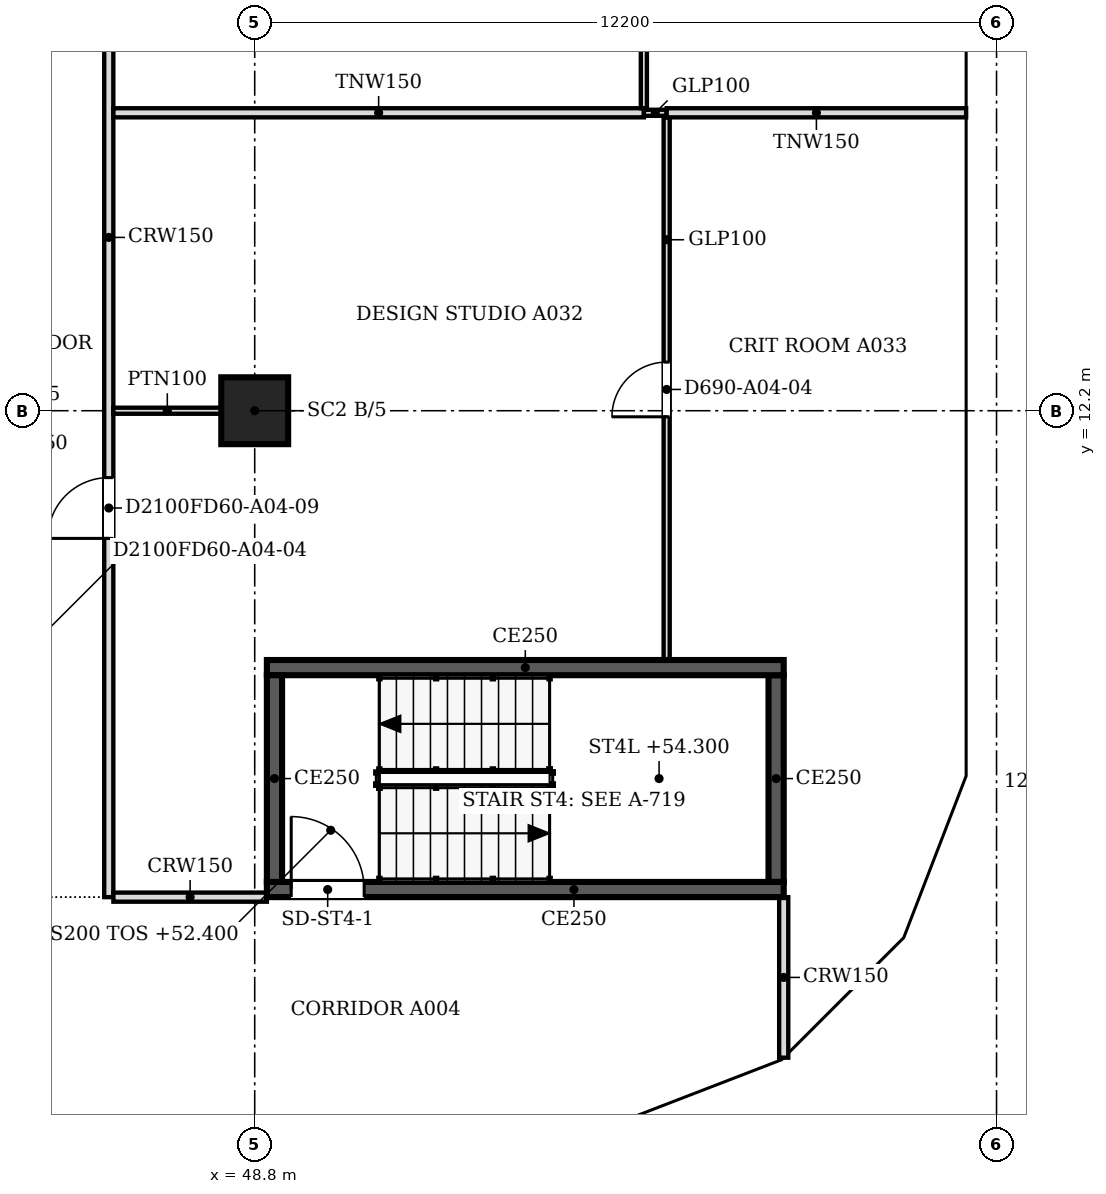
"""IFC4 building model, lengths in metres.
Left out: names, types, materials, properties, quantities, classifications, styles, units other than length and angle.
Written with IfcOpenShell. Run it as: python <this file> out.ifc"""

import sys

from ifc_helpers import new_model, si_unit, direction, frame, frame_2d, origin, origin_2d, place, context, subcontext, project, spatial, polyline, rectangle, outline, extrude, faceted_brep, source, transform, mapped, element, fill, save


model = new_model("IFC4")
c1 = context("Model", 3, precision=1e-05, world=origin(), true_north=direction((0.0, 1.0)))
c2 = subcontext(c1, "Body", "Model", "MODEL_VIEW")
j1 = project(units=[si_unit("LENGTHUNIT", "METRE"), si_unit("PLANEANGLEUNIT", "RADIAN")], contexts=[c1])
p1 = place(None, origin())
s1 = spatial("IfcSite", under=j1, at=p1, CompositionType="ELEMENT")
p2 = place(p1, origin())
s2 = spatial("IfcBuilding", under=s1, at=p2, CompositionType="ELEMENT")
p3 = place(p2, frame((0.0, 0.0, 52.4)))
s3 = spatial("IfcBuildingStorey", under=s2, at=p3, CompositionType="ELEMENT", Elevation=52.4)
p4 = place(p3, frame((48.8, 12.2, 0.0), z_axis=(0.0, 0.0, 1.0), x_axis=(1.0, 0.0, 0.0)))
e1 = element("IfcColumn", 1, at=p4, inside=s3, PredefinedType="COLUMN", context=c2, shape_type="SweptSolid", body=[
    extrude(rectangle(XDim=1.1, YDim=1.1, at=origin_2d()), origin(), (0.0, 0.0, 1.0), 3.6),
])
m1 = source(origin(), c2, "Body", "Brep", [
    faceted_brep([(2.95, -0.25, 0.0), (3.003, -0.25, 0.068), (3.003, -0.25, 7.531), (2.95, -0.25, 7.6), (0.0, -0.25, 3.8), (0.047, 0.25, 3.86), (2.898, 0.25, 7.532), (2.898, 0.25, 0.068), (0.047, 0.25, 3.74), (2.95, 0.0, 0.0), (2.95, 0.0, 7.6), (0.0, 0.0, 3.8)], [[[0, 1, 2, 3, 4]], [[5, 6, 7, 8]], [[1, 0, 9]], [[10, 3, 2]], [[6, 5, 11, 4, 3, 10]], [[8, 7, 9, 0, 4, 11]], [[8, 11, 5]], [[1, 9, 7, 6, 10, 2]]]),
])
p5 = place(p3, frame((54.854, 0.25, -3.8), z_axis=(0.0, 0.0, 1.0), x_axis=(0.932970071518, 0.359953949349, 0.0)))
e2 = element("IfcWall", 2, at=p5, inside=s3, PredefinedType="SOLIDWALL", context=c2, shape_type="MappedRepresentation", body=[
    mapped(m1, transform((0.0, 0.0, 0.0), scale=1.0)),
])
m2 = source(origin(), c2, "Body", "SweptSolid", [
    extrude(outline(polyline([(2.75, 6.935), (0.316, 3.8), (2.75, 0.665), (2.75, 6.935)])), frame((0.0, 0.26, 0.0), z_axis=(0.0, -1.0, 0.0), x_axis=(1.0, 0.0, 0.0)), (0.0, 0.0, 1.0), 0.52),
])
p6 = place(p5, origin())
e3 = element("IfcOpeningElement", 3, at=p6, cuts=e2, PredefinedType="OPENING", context=c2, shape_type="MappedRepresentation", body=[
    mapped(m2, transform((0.0, 0.0, 0.0), scale=1.0)),
])
m3 = source(origin(), c2, "Body", "Brep", [
    faceted_brep([(0.053, -0.25, 0.0), (2.997, -0.25, 3.8), (0.053, -0.25, 7.6), (0.0, -0.25, 7.532), (0.0, -0.25, 0.068), (0.106, 0.25, 7.531), (2.944, 0.25, 3.868), (2.944, 0.25, 3.732), (0.106, 0.25, 0.068), (2.997, 0.0, 3.8), (0.053, 0.0, 0.0), (0.053, 0.0, 7.6)], [[[0, 1, 2, 3, 4]], [[5, 6, 7, 8]], [[8, 7, 9, 1, 0, 10]], [[6, 5, 11, 2, 1, 9]], [[3, 2, 11]], [[10, 0, 4]], [[8, 10, 4, 3, 11, 5]], [[9, 7, 6]]]),
])
p7 = place(p3, frame((57.569, 1.274, -3.8), z_axis=(0.0, 0.0, 1.0), x_axis=(0.707066050402, 0.707147509625, 0.0)))
e4 = element("IfcWall", 4, at=p7, inside=s3, PredefinedType="SOLIDWALL", context=c2, shape_type="MappedRepresentation", body=[
    mapped(m3, transform((0.0, 0.0, 0.0), scale=1.0)),
])
m4 = source(origin(), c2, "Body", "SweptSolid", [
    extrude(outline(polyline([(0.253, 0.666), (2.681, 3.8), (0.253, 6.934), (0.253, 0.666)])), frame((0.0, 0.26, 0.0), z_axis=(0.0, -1.0, 0.0), x_axis=(1.0, 0.0, 0.0)), (0.0, 0.0, 1.0), 0.52),
])
p8 = place(p7, origin())
e5 = element("IfcOpeningElement", 5, at=p8, cuts=e4, PredefinedType="OPENING", context=c2, shape_type="MappedRepresentation", body=[
    mapped(m4, transform((0.0, 0.0, 0.0), scale=1.0)),
])
m5 = source(origin(), c2, "Body", "Brep", [
    faceted_brep([(2.95, -0.25, 0.0), (2.997, -0.25, 0.059), (2.997, -0.25, 7.541), (2.95, -0.25, 7.6), (0.0, -0.25, 3.8), (0.053, 0.25, 3.868), (2.904, 0.25, 7.54), (2.904, 0.25, 0.06), (0.053, 0.25, 3.732), (2.95, 0.0, 0.0), (2.95, 0.0, 7.6), (0.0, 0.0, 3.8)], [[[0, 1, 2, 3, 4]], [[5, 6, 7, 8]], [[1, 0, 9]], [[10, 3, 2]], [[6, 5, 11, 4, 3, 10]], [[8, 7, 9, 0, 4, 11]], [[8, 11, 5]], [[1, 9, 7, 6, 10, 2]]]),
])
p9 = place(p3, frame((59.688, 3.394, -3.8), z_axis=(0.0, 0.0, 1.0), x_axis=(0.359972353723, 0.932962970624, 0.0)))
e6 = element("IfcWall", 6, at=p9, inside=s3, PredefinedType="SOLIDWALL", context=c2, shape_type="MappedRepresentation", body=[
    mapped(m5, transform((0.0, 0.0, 0.0), scale=1.0)),
])
p10 = place(p9, origin())
e7 = element("IfcOpeningElement", 7, at=p10, cuts=e6, PredefinedType="OPENING", context=c2, shape_type="MappedRepresentation", body=[
    mapped(m2, transform((0.0, 0.0, 0.0), scale=1.0)),
])
m6 = source(origin(), c2, "Body", "Brep", [
    faceted_brep([(0.047, -0.25, 0.0), (3.05, -0.25, 3.8), (0.047, -0.25, 7.6), (0.0, -0.25, 7.54), (0.0, -0.25, 0.06), (0.093, 0.25, 7.541), (3.05, 0.25, 3.8), (0.093, 0.25, 0.059), (0.047, 0.0, 0.0), (0.047, 0.0, 7.6)], [[[0, 1, 2, 3, 4]], [[5, 6, 7]], [[7, 6, 1, 0, 8]], [[6, 5, 9, 2, 1]], [[3, 2, 9]], [[8, 0, 4]], [[7, 8, 4, 3, 9, 5]]]),
])
p11 = place(p3, frame((60.75, 6.1, -3.8), z_axis=(0.0, 0.0, 1.0), x_axis=(0.0, 1.0, 0.0)))
e8 = element("IfcWall", 8, at=p11, inside=s3, PredefinedType="SOLIDWALL", context=c2, shape_type="MappedRepresentation", body=[
    mapped(m6, transform((0.0, 0.0, 0.0), scale=1.0)),
])
m7 = source(origin(), c2, "Body", "SweptSolid", [
    extrude(outline(polyline([(0.247, 0.656), (2.731, 3.8), (0.247, 6.944), (0.247, 0.656)])), frame((0.0, 0.26, 0.0), z_axis=(0.0, -1.0, 0.0), x_axis=(1.0, 0.0, 0.0)), (0.0, 0.0, 1.0), 0.52),
])
p12 = place(p11, origin())
e9 = element("IfcOpeningElement", 9, at=p12, cuts=e8, PredefinedType="OPENING", context=c2, shape_type="MappedRepresentation", body=[
    mapped(m7, transform((0.0, 0.0, 0.0), scale=1.0)),
])
m8 = source(origin(), c2, "Body", "SweptSolid", [
    extrude(outline(polyline([(3.05, 0.0), (6.1, 3.8), (3.05, 7.6), (0.0, 3.8), (3.05, 0.0)])), frame((0.0, 0.25, 0.0), z_axis=(0.0, -1.0, 0.0), x_axis=(1.0, 0.0, 0.0)), (0.0, 0.0, 1.0), 0.5),
])
p13 = place(p3, frame((60.75, 9.15, -3.8), z_axis=(0.0, 0.0, 1.0), x_axis=(0.0, 1.0, 0.0)))
e10 = element("IfcWall", 10, at=p13, inside=s3, PredefinedType="SOLIDWALL", context=c2, shape_type="MappedRepresentation", body=[
    mapped(m8, transform((0.0, 0.0, 0.0), scale=1.0)),
])
m9 = source(origin(), c2, "Body", "SweptSolid", [
    extrude(outline(polyline([(3.05, 0.399), (5.78, 3.8), (3.05, 7.2), (0.321, 3.8), (3.05, 0.399)])), frame((0.0, 0.26, 0.0), z_axis=(0.0, -1.0, 0.0), x_axis=(1.0, 0.0, 0.0)), (0.0, 0.0, 1.0), 0.52),
])
p14 = place(p13, origin())
e11 = element("IfcOpeningElement", 11, at=p14, cuts=e10, PredefinedType="OPENING", context=c2, shape_type="MappedRepresentation", body=[
    mapped(m9, transform((0.0, 0.0, 0.0), scale=1.0)),
])
p15 = place(p3, frame((60.75, 15.25, -3.8), z_axis=(0.0, 0.0, 1.0), x_axis=(0.0, 1.0, 0.0)))
e12 = element("IfcWall", 12, at=p15, inside=s3, PredefinedType="SOLIDWALL", context=c2, shape_type="MappedRepresentation", body=[
    mapped(m8, transform((0.0, 0.0, 0.0), scale=1.0)),
])
p16 = place(p15, origin())
e13 = element("IfcOpeningElement", 13, at=p16, cuts=e12, PredefinedType="OPENING", context=c2, shape_type="MappedRepresentation", body=[
    mapped(m9, transform((0.0, 0.0, 0.0), scale=1.0)),
])
p17 = place(p2, frame((0.0, 0.0, 56.2)))
s4 = spatial("IfcBuildingStorey", under=s2, at=p17, CompositionType="ELEMENT", Elevation=56.2)
m10 = source(origin(), c2, "Body", "Brep", [
    faceted_brep([(0.047, -0.25, 0.0), (2.997, -0.25, 3.8), (0.047, -0.25, 7.6), (0.0, -0.25, 7.541), (0.0, -0.25, 0.059), (0.093, 0.25, 7.54), (2.944, 0.25, 3.868), (2.944, 0.25, 3.732), (0.093, 0.25, 0.06), (2.997, 0.0, 3.8), (0.047, 0.0, 0.0), (0.047, 0.0, 7.6)], [[[0, 1, 2, 3, 4]], [[5, 6, 7, 8]], [[8, 7, 9, 1, 0, 10]], [[6, 5, 11, 2, 1, 9]], [[3, 2, 11]], [[10, 0, 4]], [[8, 10, 4, 3, 11, 5]], [[9, 7, 6]]]),
])
p18 = place(p17, frame((54.81, 0.233, -3.8), z_axis=(0.0, 0.0, 1.0), x_axis=(0.932990326376, 0.359901446078, 0.0)))
e14 = element("IfcWall", 14, at=p18, inside=s4, PredefinedType="SOLIDWALL", context=c2, shape_type="MappedRepresentation", body=[
    mapped(m10, transform((0.0, 0.0, 0.0), scale=1.0)),
])
m11 = source(origin(), c2, "Body", "SweptSolid", [
    extrude(outline(polyline([(0.247, 0.665), (2.681, 3.8), (0.247, 6.935), (0.247, 0.665)])), frame((0.0, 0.26, 0.0), z_axis=(0.0, -1.0, 0.0), x_axis=(1.0, 0.0, 0.0)), (0.0, 0.0, 1.0), 0.52),
])
p19 = place(p18, origin())
e15 = element("IfcOpeningElement", 15, at=p19, cuts=e14, PredefinedType="OPENING", context=c2, shape_type="MappedRepresentation", body=[
    mapped(m11, transform((0.0, 0.0, 0.0), scale=1.0)),
])
m12 = source(origin(), c2, "Body", "Brep", [
    faceted_brep([(2.944, -0.25, 0.0), (2.997, -0.25, 0.068), (2.997, -0.25, 7.532), (2.944, -0.25, 7.6), (0.0, -0.25, 3.8), (0.053, 0.25, 3.868), (2.891, 0.25, 7.532), (2.891, 0.25, 0.068), (0.053, 0.25, 3.732), (2.944, 0.0, 0.0), (2.944, 0.0, 7.6), (0.0, 0.0, 3.8)], [[[0, 1, 2, 3, 4]], [[5, 6, 7, 8]], [[1, 0, 9]], [[10, 3, 2]], [[6, 5, 11, 4, 3, 10]], [[8, 7, 9, 0, 4, 11]], [[8, 11, 5]], [[1, 9, 7, 6, 10, 2]]]),
])
p20 = place(p17, frame((57.606, 1.312, -3.8), z_axis=(0.0, 0.0, 1.0), x_axis=(0.707147509625, 0.707066050402, 0.0)))
e16 = element("IfcWall", 16, at=p20, inside=s4, PredefinedType="SOLIDWALL", context=c2, shape_type="MappedRepresentation", body=[
    mapped(m12, transform((0.0, 0.0, 0.0), scale=1.0)),
])
m13 = source(origin(), c2, "Body", "SweptSolid", [
    extrude(outline(polyline([(2.744, 6.934), (0.316, 3.8), (2.744, 0.667), (2.744, 6.934)])), frame((0.0, 0.26, 0.0), z_axis=(0.0, -1.0, 0.0), x_axis=(1.0, 0.0, 0.0)), (0.0, 0.0, 1.0), 0.52),
])
p21 = place(p20, origin())
e17 = element("IfcOpeningElement", 17, at=p21, cuts=e16, PredefinedType="OPENING", context=c2, shape_type="MappedRepresentation", body=[
    mapped(m13, transform((0.0, 0.0, 0.0), scale=1.0)),
])
m14 = source(origin(), c2, "Body", "Brep", [
    faceted_brep([(0.053, -0.25, 0.0), (3.003, -0.25, 3.8), (0.053, -0.25, 7.6), (0.0, -0.25, 7.532), (0.0, -0.25, 0.068), (0.106, 0.25, 7.532), (2.957, 0.25, 3.86), (2.957, 0.25, 3.74), (0.106, 0.25, 0.068), (3.003, 0.0, 3.8), (0.053, 0.0, 0.0), (0.053, 0.0, 7.6)], [[[0, 1, 2, 3, 4]], [[5, 6, 7, 8]], [[8, 7, 9, 1, 0, 10]], [[6, 5, 11, 2, 1, 9]], [[3, 2, 11]], [[10, 0, 4]], [[8, 10, 4, 3, 11, 5]], [[9, 7, 6]]]),
])
p22 = place(p17, frame((59.669, 3.344, -3.8), z_axis=(0.0, 0.0, 1.0), x_axis=(0.35992665181, 0.932980602862, 0.0)))
e18 = element("IfcWall", 18, at=p22, inside=s4, PredefinedType="SOLIDWALL", context=c2, shape_type="MappedRepresentation", body=[
    mapped(m14, transform((0.0, 0.0, 0.0), scale=1.0)),
])
m15 = source(origin(), c2, "Body", "SweptSolid", [
    extrude(outline(polyline([(0.253, 0.665), (2.687, 3.8), (0.253, 6.935), (0.253, 0.665)])), frame((0.0, 0.26, 0.0), z_axis=(0.0, -1.0, 0.0), x_axis=(1.0, 0.0, 0.0)), (0.0, 0.0, 1.0), 0.52),
])
p23 = place(p22, origin())
e19 = element("IfcOpeningElement", 19, at=p23, cuts=e18, PredefinedType="OPENING", context=c2, shape_type="MappedRepresentation", body=[
    mapped(m15, transform((0.0, 0.0, 0.0), scale=1.0)),
])
m16 = source(origin(), c2, "Body", "Brep", [
    faceted_brep([(3.003, -0.25, 0.0), (6.053, -0.25, 3.8), (3.003, -0.25, 7.6), (0.0, -0.25, 3.8), (0.047, 0.25, 3.859), (3.003, 0.25, 7.6), (6.053, 0.25, 3.8), (3.003, 0.25, 0.0), (0.047, 0.25, 3.741), (0.0, 0.0, 3.8)], [[[0, 1, 2, 3]], [[4, 5, 6, 7, 8]], [[7, 6, 1, 0]], [[6, 5, 2, 1]], [[5, 4, 9, 3, 2]], [[8, 7, 0, 3, 9]], [[8, 9, 4]]]),
])
p24 = place(p17, frame((60.75, 6.146, -3.8), z_axis=(0.0, 0.0, 1.0), x_axis=(0.0, 1.0, 0.0)))
e20 = element("IfcWall", 20, at=p24, inside=s4, PredefinedType="SOLIDWALL", context=c2, shape_type="MappedRepresentation", body=[
    mapped(m16, transform((0.0, 0.0, 0.0), scale=1.0)),
])
m17 = source(origin(), c2, "Body", "SweptSolid", [
    extrude(outline(polyline([(3.005, 0.401), (5.733, 3.8), (3.005, 7.199), (0.319, 3.8), (3.005, 0.401)])), frame((0.0, 0.26, 0.0), z_axis=(0.0, -1.0, 0.0), x_axis=(1.0, 0.0, 0.0)), (0.0, 0.0, 1.0), 0.52),
])
p25 = place(p24, origin())
e21 = element("IfcOpeningElement", 21, at=p25, cuts=e20, PredefinedType="OPENING", context=c2, shape_type="MappedRepresentation", body=[
    mapped(m17, transform((0.0, 0.0, 0.0), scale=1.0)),
])
m18 = source(origin(), c2, "Body", "SweptSolid", [
    extrude(outline(polyline([(3.05, 0.0), (6.1, 3.8), (3.05, 7.6), (0.0, 3.8), (3.05, 0.0)])), frame((0.0, 0.25, 0.0), z_axis=(0.0, -1.0, 0.0), x_axis=(1.0, 0.0, 0.0)), (0.0, 0.0, 1.0), 0.5),
])
p26 = place(p17, frame((60.75, 12.2, -3.8), z_axis=(0.0, 0.0, 1.0), x_axis=(0.0, 1.0, 0.0)))
e22 = element("IfcWall", 22, at=p26, inside=s4, PredefinedType="SOLIDWALL", context=c2, shape_type="MappedRepresentation", body=[
    mapped(m18, transform((0.0, 0.0, 0.0), scale=1.0)),
])
m19 = source(origin(), c2, "Body", "SweptSolid", [
    extrude(outline(polyline([(3.05, 0.399), (5.78, 3.8), (3.05, 7.201), (0.321, 3.8), (3.05, 0.399)])), frame((0.0, 0.26, 0.0), z_axis=(0.0, -1.0, 0.0), x_axis=(1.0, 0.0, 0.0)), (0.0, 0.0, 1.0), 0.52),
])
p27 = place(p26, origin())
e23 = element("IfcOpeningElement", 23, at=p27, cuts=e22, PredefinedType="OPENING", context=c2, shape_type="MappedRepresentation", body=[
    mapped(m19, transform((0.0, 0.0, 0.0), scale=1.0)),
])
p28 = place(p3, frame((57.5, 4.325, 0.0), z_axis=(0.0, 0.0, 1.0), x_axis=(-1.0, 0.0, 0.0)))
e24 = element("IfcWall", 24, at=p28, inside=s3, PredefinedType="SOLIDWALL", context=c2, shape_type="SweptSolid", body=[
    extrude(rectangle(XDim=8.5, YDim=0.25, at=frame_2d((4.25, 0.0))), origin(), (0.0, 0.0, 1.0), 3.8),
])
m20 = source(origin(), c2, "Body", "SweptSolid", [
    extrude(rectangle(XDim=1.2, YDim=2.1, at=frame_2d((0.6, 1.05))), frame((0.0, 0.135, 0.0), z_axis=(0.0, -1.0, 0.0), x_axis=(1.0, 0.0, 0.0)), (0.0, 0.0, 1.0), 0.27),
])
p29 = place(p28, frame((6.9, 0.0, 0.0)))
e25 = element("IfcOpeningElement", 25, at=p29, cuts=e24, PredefinedType="OPENING", context=c2, shape_type="MappedRepresentation", body=[
    mapped(m20, transform((0.0, 0.0, 0.0), scale=1.0)),
])
p30 = place(p3, frame((49.125, 4.45, 0.0), z_axis=(0.0, 0.0, 1.0), x_axis=(0.0, 1.0, 0.0)))
e26 = element("IfcWall", 26, at=p30, inside=s3, PredefinedType="SOLIDWALL", context=c2, shape_type="SweptSolid", body=[
    extrude(rectangle(XDim=3.4, YDim=0.25, at=frame_2d((1.7, 0.0))), origin(), (0.0, 0.0, 1.0), 3.8),
])
p31 = place(p3, frame((49.0, 7.975, 0.0), z_axis=(0.0, 0.0, 1.0), x_axis=(1.0, 0.0, 0.0)))
e27 = element("IfcWall", 27, at=p31, inside=s3, PredefinedType="SOLIDWALL", context=c2, shape_type="SweptSolid", body=[
    extrude(rectangle(XDim=8.5, YDim=0.25, at=frame_2d((4.25, 0.0))), origin(), (0.0, 0.0, 1.0), 3.8),
])
p32 = place(p3, frame((57.375, 7.85, 0.0), z_axis=(0.0, 0.0, 1.0), x_axis=(0.0, -1.0, 0.0)))
e28 = element("IfcWall", 28, at=p32, inside=s3, PredefinedType="SOLIDWALL", context=c2, shape_type="SweptSolid", body=[
    extrude(rectangle(XDim=3.4, YDim=0.25, at=frame_2d((1.7, 0.0))), origin(), (0.0, 0.0, 1.0), 3.8),
])
p33 = place(p3, frame((57.5, 1.559, 0.0), z_axis=(0.0, 0.0, 1.0), x_axis=(0.0, 1.0, 0.0)))
e29 = element("IfcWall", 29, at=p33, inside=s3, PredefinedType="PARTITIONING", context=c2, shape_type="SweptSolid", body=[
    extrude(rectangle(XDim=2.641, YDim=0.15, at=frame_2d((1.32, 0.0))), origin(), (0.0, 0.0, 1.0), 3.067),
])
p34 = place(p3, frame((46.4, 21.924, 0.0), z_axis=(0.0, 0.0, 1.0), x_axis=(0.0, -1.0, 0.0)))
e30 = element("IfcWall", 30, at=p34, inside=s3, PredefinedType="PARTITIONING", context=c2, shape_type="SweptSolid", body=[
    extrude(rectangle(XDim=17.724, YDim=0.15, at=frame_2d((8.862, 0.0))), origin(), (0.0, 0.0, 1.0), 3.067),
])
m21 = source(origin(), c2, "Body", "SweptSolid", [
    extrude(rectangle(XDim=1.0, YDim=2.1, at=frame_2d((0.5, 1.05))), frame((0.0, 0.085, 0.0), z_axis=(0.0, -1.0, 0.0), x_axis=(1.0, 0.0, 0.0)), (0.0, 0.0, 1.0), 0.17),
])
p35 = place(p34, frame((1.923, 0.0, 0.0)))
e31 = element("IfcOpeningElement", 31, at=p35, cuts=e30, PredefinedType="OPENING", context=c2, shape_type="MappedRepresentation", body=[
    mapped(m21, transform((0.0, 0.0, 0.0), scale=1.0)),
])
p36 = place(p34, frame((10.824, 0.0, 0.0)))
e32 = element("IfcOpeningElement", 32, at=p36, cuts=e30, PredefinedType="OPENING", context=c2, shape_type="MappedRepresentation", body=[
    mapped(m21, transform((0.0, 0.0, 0.0), scale=1.0)),
])
p37 = place(p3, frame((46.476, 4.2, 0.0), z_axis=(0.0, 0.0, 1.0), x_axis=(1.0, 0.0, 0.0)))
e33 = element("IfcWall", 33, at=p37, inside=s3, PredefinedType="PARTITIONING", context=c2, shape_type="SweptSolid", body=[
    extrude(rectangle(XDim=2.524, YDim=0.15, at=frame_2d((1.262, 0.0))), origin(), (0.0, 0.0, 1.0), 3.067),
])
p38 = place(p3, frame((55.575, 17.024, 0.0), z_axis=(0.0, 0.0, 1.0), x_axis=(0.0, -1.0, 0.0)))
e34 = element("IfcWall", 34, at=p38, inside=s3, PredefinedType="PARTITIONING", context=c2, shape_type="SweptSolid", body=[
    extrude(rectangle(XDim=8.924, YDim=0.1, at=frame_2d((4.462, 0.0))), origin(), (0.0, 0.0, 1.0), 3.067),
])
m22 = source(origin(), c2, "Body", "SweptSolid", [
    extrude(rectangle(XDim=0.9, YDim=2.1, at=frame_2d((0.45, 1.05))), frame((0.0, 0.06, 0.0), z_axis=(0.0, -1.0, 0.0), x_axis=(1.0, 0.0, 0.0)), (0.0, 0.0, 1.0), 0.12),
])
p39 = place(p38, frame((4.024, 0.0, 0.0)))
e35 = element("IfcOpeningElement", 35, at=p39, cuts=e34, PredefinedType="OPENING", context=c2, shape_type="MappedRepresentation", body=[
    mapped(m22, transform((0.0, 0.0, 0.0), scale=1.0)),
])
p40 = place(p3, frame((48.25, 12.2, 0.0), z_axis=(0.0, 0.0, 1.0), x_axis=(-1.0, 0.0, 0.0)))
e36 = element("IfcWall", 36, at=p40, inside=s3, PredefinedType="PARTITIONING", context=c2, shape_type="SweptSolid", body=[
    extrude(rectangle(XDim=1.775, YDim=0.1, at=frame_2d((0.887, 0.0))), origin(), (0.0, 0.0, 1.0), 3.067),
])
p41 = place(p3, frame((46.476, 17.1, 0.0), z_axis=(0.0, 0.0, 1.0), x_axis=(1.0, 0.0, 0.0)))
e37 = element("IfcWall", 37, at=p41, inside=s3, PredefinedType="PARTITIONING", context=c2, shape_type="SweptSolid", body=[
    extrude(rectangle(XDim=8.724, YDim=0.15, at=frame_2d((4.362, 0.0))), origin(), (0.0, 0.0, 1.0), 3.067),
])
p42 = place(p3, frame((55.201, 17.1, 0.0), z_axis=(0.0, 0.0, 1.0), x_axis=(1.0, 0.0, 0.0)))
e38 = element("IfcWall", 38, at=p42, inside=s3, PredefinedType="PARTITIONING", context=c2, shape_type="SweptSolid", body=[
    extrude(rectangle(XDim=0.373, YDim=0.1, at=frame_2d((0.187, 0.0))), origin(), (0.0, 0.0, 1.0), 3.067),
])
p43 = place(p3, frame((55.575, 17.1, 0.0), z_axis=(0.0, 0.0, 1.0), x_axis=(1.0, 0.0, 0.0)))
e39 = element("IfcWall", 39, at=p43, inside=s3, PredefinedType="PARTITIONING", context=c2, shape_type="SweptSolid", body=[
    extrude(rectangle(XDim=4.925, YDim=0.15, at=frame_2d((2.462, 0.0))), origin(), (0.0, 0.0, 1.0), 3.067),
])
p44 = place(p3, frame((55.2, 21.924, 0.0), z_axis=(0.0, 0.0, 1.0), x_axis=(0.0, -1.0, 0.0)))
e40 = element("IfcWall", 40, at=p44, inside=s3, PredefinedType="PARTITIONING", context=c2, shape_type="SweptSolid", body=[
    extrude(rectangle(XDim=4.748, YDim=0.1, at=frame_2d((2.374, 0.0))), origin(), (0.0, 0.0, 1.0), 3.067),
])
p45 = place(p44, frame((1.948, 0.0, 0.0)))
e41 = element("IfcOpeningElement", 41, at=p45, cuts=e40, PredefinedType="OPENING", context=c2, shape_type="MappedRepresentation", body=[
    mapped(m22, transform((0.0, 0.0, 0.0), scale=1.0)),
])
m23 = source(origin(), c2, "Body", "SweptSolid", [
    extrude(rectangle(XDim=1.2, YDim=2.1, at=frame_2d((0.6, 1.05))), frame((0.0, 0.025, 0.0), z_axis=(0.0, -1.0, 0.0), x_axis=(1.0, 0.0, 0.0)), (0.0, 0.0, 1.0), 0.05),
])
p46 = place(p29, origin())
e42 = element("IfcDoor", 42, at=p46, inside=s3, OperationType="SINGLE_SWING_RIGHT", PredefinedType="DOOR", context=c2, shape_type="MappedRepresentation", body=[
    mapped(m23, transform((0.0, 0.0, 0.0), scale=1.0)),
])
fill(e25, e42)
m24 = source(origin(), c2, "Body", "SweptSolid", [
    extrude(rectangle(XDim=0.9, YDim=2.1, at=frame_2d((0.45, 1.05))), frame((0.0, 0.025, 0.0), z_axis=(0.0, -1.0, 0.0), x_axis=(1.0, 0.0, 0.0)), (0.0, 0.0, 1.0), 0.05),
])
p47 = place(p39, origin())
e43 = element("IfcDoor", 43, at=p47, inside=s3, OperationType="SINGLE_SWING_RIGHT", PredefinedType="DOOR", context=c2, shape_type="MappedRepresentation", body=[
    mapped(m24, transform((0.0, 0.0, 0.0), scale=1.0)),
])
fill(e35, e43)
m25 = source(origin(), c2, "Body", "SweptSolid", [
    extrude(rectangle(XDim=1.0, YDim=2.1, at=frame_2d((0.5, 1.05))), frame((0.0, 0.025, 0.0), z_axis=(0.0, -1.0, 0.0), x_axis=(1.0, 0.0, 0.0)), (0.0, 0.0, 1.0), 0.05),
])
p48 = place(p36, origin())
e44 = element("IfcDoor", 44, at=p48, inside=s3, OperationType="SINGLE_SWING_RIGHT", PredefinedType="DOOR", context=c2, shape_type="MappedRepresentation", body=[
    mapped(m25, transform((0.0, 0.0, 0.0), scale=1.0)),
])
fill(e32, e44)
save(model, sys.argv[1])
